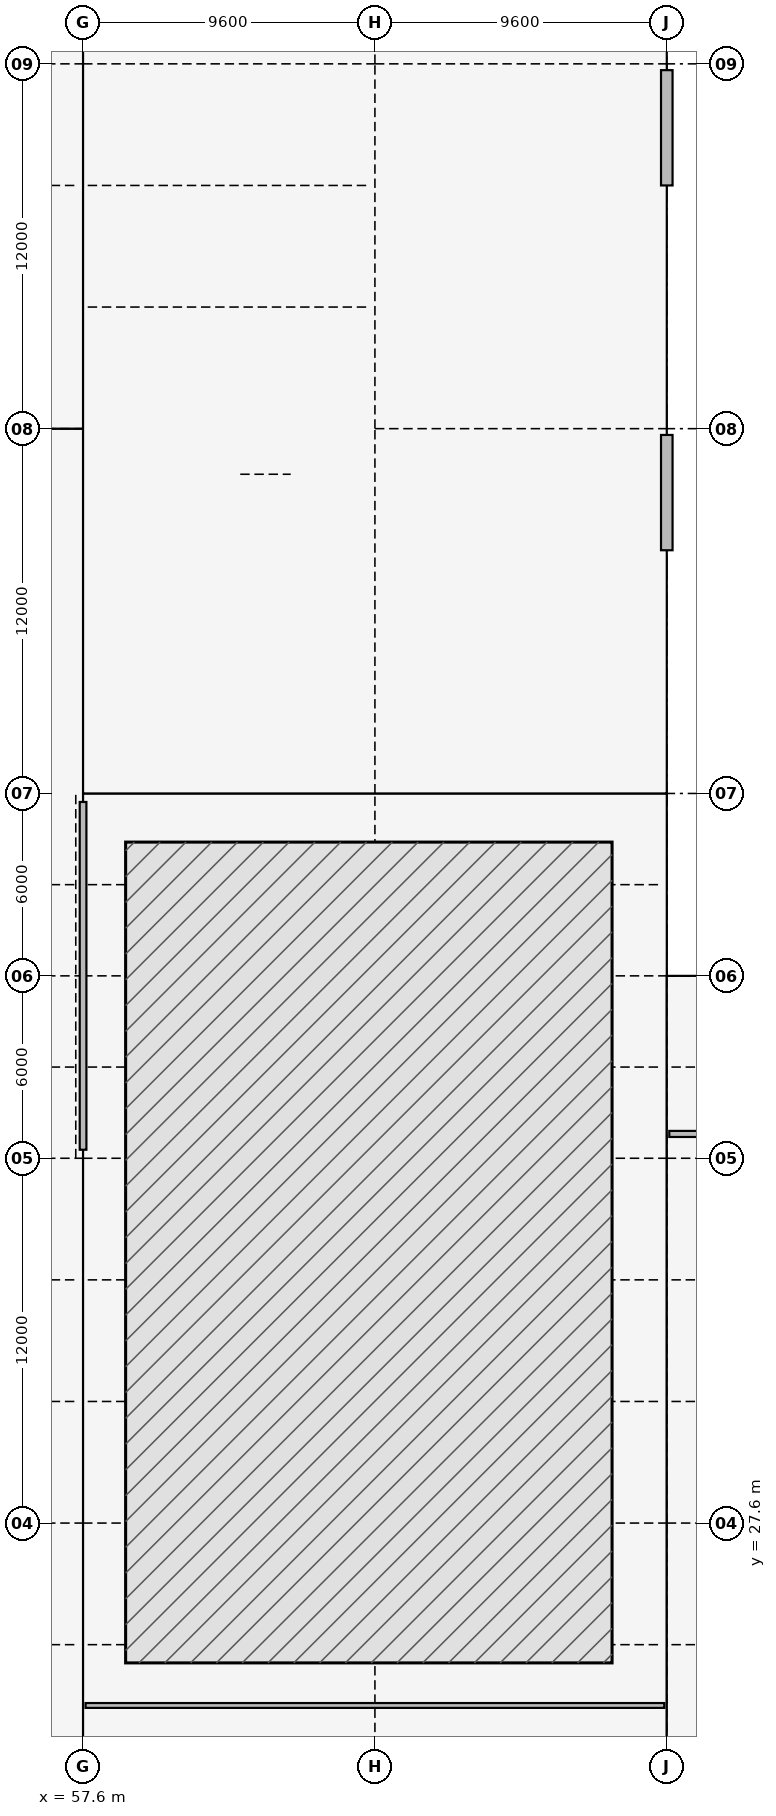
"""IFC4 building model, lengths in metres.
Left out: names, types, materials, properties, quantities, classifications, styles, units other than length and angle.
Written with IfcOpenShell. Run it as: python <this file> out.ifc"""

import sys

from ifc_helpers import new_model, si_unit, direction, frame, frame_2d, origin, origin_2d, place, context, subcontext, project, spatial, rectangle, hollow_circle, i_section, extrude, element, fill, save


model = new_model("IFC4")
c1 = context("Model", 3, precision=1e-05, world=origin(), true_north=direction((0.0, 1.0)))
c2 = subcontext(c1, "Body", "Model", "MODEL_VIEW")
j1 = project(units=[si_unit("LENGTHUNIT", "METRE"), si_unit("PLANEANGLEUNIT", "RADIAN")], contexts=[c1])
p1 = place(None, origin())
s1 = spatial("IfcSite", under=j1, at=p1, CompositionType="ELEMENT")
p2 = place(p1, origin())
s2 = spatial("IfcBuilding", under=s1, at=p2, CompositionType="ELEMENT")
p3 = place(p2, origin())
s3 = spatial("IfcBuildingStorey", under=s2, at=p3, CompositionType="ELEMENT", Elevation=0.0)
for number, where, z_axis, x_axis in (
    (1, (57.6, 27.6, 0.0), (0.0, 0.0, 1.0), (1.0, 0.0, 0.0)),
    (2, (57.6, 39.6, 0.0), (0.0, 0.0, 1.0), (1.0, 0.0, 0.0)),
    (3, (57.6, 45.6, 0.0), (0.0, 0.0, 1.0), (1.0, 0.0, 0.0)),
    (4, (57.6, 51.6, 0.0), (0.0, 0.0, 1.0), (1.0, 0.0, 0.0)),
    (5, (57.6, 63.6, 0.0), (0.0, 0.0, 1.0), (1.0, 0.0, 0.0)),
    (6, (57.6, 75.6, 0.0), (0.0, 0.0, 1.0), (1.0, 0.0, 0.0)),
):
    element("IfcColumn", number, at=place(p3, frame(where, z_axis=z_axis, x_axis=x_axis)), inside=s3, PredefinedType="COLUMN", context=c2, shape_type="SweptSolid", body=[
        extrude(i_section(OverallWidth=0.3, OverallDepth=0.65, WebThickness=0.016, FlangeThickness=0.031, FilletRadius=0.027, at=origin_2d()), origin(), (0.0, 0.0, 1.0), 5.4),
    ])
for number, where, z_axis, x_axis in (
    (7, (67.2, 27.6, 0.0), (0.0, 0.0, 1.0), (1.0, 0.0, 0.0)),
    (8, (67.2, 39.6, 0.0), (0.0, 0.0, 1.0), (1.0, 0.0, 0.0)),
    (9, (67.2, 45.6, 0.0), (0.0, 0.0, 1.0), (1.0, 0.0, 0.0)),
    (10, (67.2, 51.6, 0.0), (0.0, 0.0, 1.0), (1.0, 0.0, 0.0)),
    (11, (67.2, 63.6, 0.0), (0.0, 0.0, 1.0), (1.0, 0.0, 0.0)),
    (12, (67.2, 75.6, 0.0), (0.0, 0.0, 1.0), (1.0, 0.0, 0.0)),
    (13, (76.8, 27.6, 0.0), (0.0, 0.0, 1.0), (1.0, 0.0, 0.0)),
    (14, (76.8, 39.6, 0.0), (0.0, 0.0, 1.0), (1.0, 0.0, 0.0)),
    (15, (76.8, 45.6, 0.0), (0.0, 0.0, 1.0), (1.0, 0.0, 0.0)),
    (16, (76.8, 51.6, 0.0), (0.0, 0.0, 1.0), (1.0, 0.0, 0.0)),
    (17, (76.8, 63.6, 0.0), (0.0, 0.0, 1.0), (1.0, 0.0, 0.0)),
    (18, (76.8, 75.6, 0.0), (0.0, 0.0, 1.0), (1.0, 0.0, 0.0)),
):
    element("IfcColumn", number, at=place(p3, frame(where, z_axis=z_axis, x_axis=x_axis)), inside=s3, PredefinedType="COLUMN", context=c2, shape_type="SweptSolid", body=[
        extrude(hollow_circle(Radius=0.203, WallThickness=0.016, at=origin_2d()), origin(), (0.0, 0.0, 1.0), 5.4),
    ])
p4 = place(p3, frame((57.6, 39.88, 0.0), z_axis=(0.0, 0.0, 1.0), x_axis=(0.0, 1.0, 0.0)))
e19 = element("IfcWall", 19, at=p4, inside=s3, PredefinedType="PARTITIONING", context=c2, shape_type="SweptSolid", body=[
    extrude(rectangle(XDim=11.44, YDim=0.22, at=frame_2d((5.72, 0.0))), origin(), (0.0, 0.0, 1.0), 4.75),
])
p5 = place(p3, frame((76.8, 63.393, 0.0), z_axis=(0.0, 0.0, 1.0), x_axis=(0.0, -1.0, 0.0)))
e20 = element("IfcWall", 20, at=p5, inside=s3, PredefinedType="STANDARD", context=c2, shape_type="SweptSolid", body=[
    extrude(rectangle(XDim=3.793, YDim=0.38, at=frame_2d((1.896, 0.0))), origin(), (0.0, 0.0, 1.0), 4.735),
])
p6 = place(p5, frame((0.7, 0.0, 0.0)))
e21 = element("IfcOpeningElement", 21, at=p6, cuts=e20, PredefinedType="OPENING", context=c2, shape_type="SweptSolid", body=[
    extrude(rectangle(XDim=2.0, YDim=2.3, at=frame_2d((1.0, 1.15))), frame((0.0, 0.2, 0.0), z_axis=(0.0, -1.0, 0.0), x_axis=(1.0, 0.0, 0.0)), (0.0, 0.0, 1.0), 0.4),
])
p7 = place(p3, frame((76.8, 75.393, 0.0), z_axis=(0.0, 0.0, 1.0), x_axis=(0.0, -1.0, 0.0)))
e22 = element("IfcWall", 22, at=p7, inside=s3, PredefinedType="STANDARD", context=c2, shape_type="SweptSolid", body=[
    extrude(rectangle(XDim=3.793, YDim=0.38, at=frame_2d((1.896, 0.0))), origin(), (0.0, 0.0, 1.0), 4.735),
])
p8 = place(p7, frame((0.7, 0.0, 0.0)))
e23 = element("IfcOpeningElement", 23, at=p8, cuts=e22, PredefinedType="OPENING", context=c2, shape_type="SweptSolid", body=[
    extrude(rectangle(XDim=2.0, YDim=2.3, at=frame_2d((1.0, 1.15))), frame((0.0, 0.2, 0.0), z_axis=(0.0, -1.0, 0.0), x_axis=(1.0, 0.0, 0.0)), (0.0, 0.0, 1.0), 0.4),
])
p9 = place(p3, frame((57.682, 21.6, 0.0), z_axis=(0.0, 0.0, 1.0), x_axis=(1.0, 0.0, 0.0)))
e24 = element("IfcWall", 24, at=p9, inside=s3, PredefinedType="PARTITIONING", context=c2, shape_type="SweptSolid", body=[
    extrude(rectangle(XDim=19.036, YDim=0.16, at=frame_2d((9.518, 0.0))), origin(), (0.0, 0.0, 1.0), 5.04),
])
p10 = place(p9, frame((3.5, 0.0, 0.0)))
e25 = element("IfcOpeningElement", 25, at=p10, cuts=e24, PredefinedType="OPENING", context=c2, shape_type="SweptSolid", body=[
    extrude(rectangle(XDim=1.7, YDim=2.2, at=frame_2d((0.85, 1.1))), frame((0.0, 0.09, 0.0), z_axis=(0.0, -1.0, 0.0), x_axis=(1.0, 0.0, 0.0)), (0.0, 0.0, 1.0), 0.18),
])
p11 = place(p9, frame((12.5, 0.0, 0.0)))
e26 = element("IfcOpeningElement", 26, at=p11, cuts=e24, PredefinedType="OPENING", context=c2, shape_type="SweptSolid", body=[
    extrude(rectangle(XDim=1.7, YDim=2.2, at=frame_2d((0.85, 1.1))), frame((0.0, 0.09, 0.0), z_axis=(0.0, -1.0, 0.0), x_axis=(1.0, 0.0, 0.0)), (0.0, 0.0, 1.0), 0.18),
])
p12 = place(p3, frame((76.882, 40.4, 0.0), z_axis=(0.0, 0.0, 1.0), x_axis=(1.0, 0.0, 0.0)))
e27 = element("IfcWall", 27, at=p12, inside=s3, PredefinedType="PARTITIONING", context=c2, shape_type="SweptSolid", body=[
    extrude(rectangle(XDim=71.806, YDim=0.2, at=frame_2d((35.903, 0.0))), origin(), (0.0, 0.0, 1.0), 5.04),
])
p13 = place(p12, frame((16.0, 0.0, 0.0)))
e28 = element("IfcOpeningElement", 28, at=p13, cuts=e27, PredefinedType="OPENING", context=c2, shape_type="SweptSolid", body=[
    extrude(rectangle(XDim=1.6, YDim=2.2, at=frame_2d((0.8, 1.1))), frame((0.0, 0.11, 0.0), z_axis=(0.0, -1.0, 0.0), x_axis=(1.0, 0.0, 0.0)), (0.0, 0.0, 1.0), 0.22),
])
p14 = place(p12, frame((40.0, 0.0, 0.0)))
e29 = element("IfcOpeningElement", 29, at=p14, cuts=e27, PredefinedType="OPENING", context=c2, shape_type="SweptSolid", body=[
    extrude(rectangle(XDim=1.6, YDim=2.2, at=frame_2d((0.8, 1.1))), frame((0.0, 0.11, 0.0), z_axis=(0.0, -1.0, 0.0), x_axis=(1.0, 0.0, 0.0)), (0.0, 0.0, 1.0), 0.22),
])
p15 = place(p12, frame((53.0, 0.0, 0.0)))
e30 = element("IfcOpeningElement", 30, at=p15, cuts=e27, PredefinedType="OPENING", context=c2, shape_type="SweptSolid", body=[
    extrude(rectangle(XDim=1.2, YDim=2.2, at=frame_2d((0.6, 1.1))), frame((0.0, 0.11, 0.0), z_axis=(0.0, -1.0, 0.0), x_axis=(1.0, 0.0, 0.0)), (0.0, 0.0, 1.0), 0.22),
])
p16 = place(p12, frame((63.0, 0.0, 0.0)))
e31 = element("IfcOpeningElement", 31, at=p16, cuts=e27, PredefinedType="OPENING", context=c2, shape_type="SweptSolid", body=[
    extrude(rectangle(XDim=1.02, YDim=2.12, at=frame_2d((0.51, 1.06))), frame((0.0, 0.11, 0.0), z_axis=(0.0, -1.0, 0.0), x_axis=(1.0, 0.0, 0.0)), (0.0, 0.0, 1.0), 0.22),
])
p17 = place(p12, frame((67.4, 0.0, 0.0)))
e32 = element("IfcOpeningElement", 32, at=p17, cuts=e27, PredefinedType="OPENING", context=c2, shape_type="SweptSolid", body=[
    extrude(rectangle(XDim=1.0, YDim=2.1, at=frame_2d((0.5, 1.05))), frame((0.0, 0.11, 0.0), z_axis=(0.0, -1.0, 0.0), x_axis=(1.0, 0.0, 0.0)), (0.0, 0.0, 1.0), 0.22),
])
p18 = place(p6, origin())
e33 = element("IfcDoor", 33, at=p18, inside=s3, OperationType="DOUBLE_DOOR_SINGLE_SWING", PredefinedType="DOOR", context=c2, shape_type="SweptSolid", body=[
    extrude(rectangle(XDim=2.0, YDim=2.3, at=frame_2d((1.0, 1.15))), frame((0.0, 0.025, 0.0), z_axis=(0.0, -1.0, 0.0), x_axis=(1.0, 0.0, 0.0)), (0.0, 0.0, 1.0), 0.05),
])
fill(e21, e33)
p19 = place(p8, origin())
e34 = element("IfcDoor", 34, at=p19, inside=s3, OperationType="DOUBLE_DOOR_SINGLE_SWING", PredefinedType="DOOR", context=c2, shape_type="SweptSolid", body=[
    extrude(rectangle(XDim=2.0, YDim=2.3, at=frame_2d((1.0, 1.15))), frame((0.0, 0.025, 0.0), z_axis=(0.0, -1.0, 0.0), x_axis=(1.0, 0.0, 0.0)), (0.0, 0.0, 1.0), 0.05),
])
fill(e23, e34)
p20 = place(p10, origin())
e35 = element("IfcDoor", 35, at=p20, inside=s3, OperationType="DOUBLE_DOOR_SINGLE_SWING", PredefinedType="DOOR", context=c2, shape_type="SweptSolid", body=[
    extrude(rectangle(XDim=1.7, YDim=2.2, at=frame_2d((0.85, 1.1))), frame((0.0, 0.025, 0.0), z_axis=(0.0, -1.0, 0.0), x_axis=(1.0, 0.0, 0.0)), (0.0, 0.0, 1.0), 0.05),
])
fill(e25, e35)
p21 = place(p11, origin())
e36 = element("IfcDoor", 36, at=p21, inside=s3, OperationType="DOUBLE_DOOR_SINGLE_SWING", PredefinedType="DOOR", context=c2, shape_type="SweptSolid", body=[
    extrude(rectangle(XDim=1.7, YDim=2.2, at=frame_2d((0.85, 1.1))), frame((0.0, 0.025, 0.0), z_axis=(0.0, -1.0, 0.0), x_axis=(1.0, 0.0, 0.0)), (0.0, 0.0, 1.0), 0.05),
])
fill(e26, e36)
save(model, sys.argv[1])
